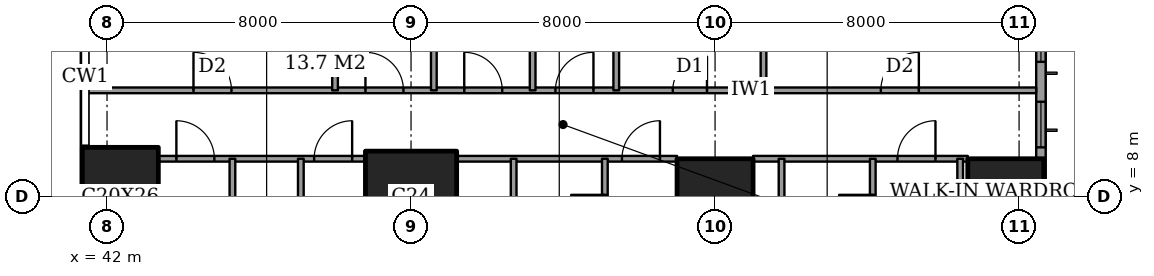
"""IFC4 building model, lengths in metres.
Left out: names, types, materials, properties, quantities, classifications, styles, units other than length and angle.
Written with IfcOpenShell. Run it as: python <this file> out.ifc"""

import sys

from ifc_helpers import new_model, si_unit, direction, frame, frame_2d, origin, origin_2d, place, context, subcontext, project, spatial, rectangle, extrude, element, fill, save


model = new_model("IFC4")
c1 = context("Model", 3, precision=1e-05, world=origin(), true_north=direction((0.0, 1.0)))
c2 = subcontext(c1, "Body", "Model", "MODEL_VIEW")
j1 = project(units=[si_unit("LENGTHUNIT", "METRE"), si_unit("PLANEANGLEUNIT", "RADIAN")], contexts=[c1])
p1 = place(None, origin())
s1 = spatial("IfcSite", under=j1, at=p1, CompositionType="ELEMENT")
p2 = place(p1, origin())
s2 = spatial("IfcBuilding", under=s1, at=p2, CompositionType="ELEMENT")
p3 = place(p2, frame((0.0, 0.0, 47.6)))
s3 = spatial("IfcBuildingStorey", under=s2, at=p3, CompositionType="ELEMENT", Elevation=47.6)
p4 = place(p3, frame((42.35, 8.0, 0.0), z_axis=(0.0, 0.0, 1.0), x_axis=(1.0, 0.0, 0.0)))
e1 = element("IfcColumn", 1, at=p4, inside=s3, PredefinedType="COLUMN", context=c2, shape_type="SweptSolid", body=[
    extrude(rectangle(XDim=2.0, YDim=2.6, at=origin_2d()), origin(), (0.0, 0.0, 1.0), 3.6),
])
p5 = place(p3, frame((50.0, 8.0, 0.0), z_axis=(0.0, 0.0, 1.0), x_axis=(1.0, 0.0, 0.0)))
e2 = element("IfcColumn", 2, at=p5, inside=s3, PredefinedType="COLUMN", context=c2, shape_type="SweptSolid", body=[
    extrude(rectangle(XDim=2.4, YDim=2.4, at=origin_2d()), origin(), (0.0, 0.0, 1.0), 3.6),
])
for number, where, z_axis, x_axis in (
    (3, (58.0, 8.0, 0.0), (0.0, 0.0, 1.0), (1.0, 0.0, 0.0)),
    (4, (65.65, 8.0, 0.0), (0.0, 0.0, 1.0), (1.0, 0.0, 0.0)),
):
    element("IfcColumn", number, at=place(p3, frame(where, z_axis=z_axis, x_axis=x_axis)), inside=s3, PredefinedType="COLUMN", context=c2, shape_type="SweptSolid", body=[
        extrude(rectangle(XDim=2.0, YDim=2.0, at=origin_2d()), origin(), (0.0, 0.0, 1.0), 3.6),
    ])
p6 = place(p3, frame((66.575, 3.175, 0.0), z_axis=(0.0, 0.0, 1.0), x_axis=(0.0, 1.0, 0.0)))
e5 = element("IfcWall", 5, at=p6, inside=s3, PredefinedType="SOLIDWALL", context=c2, shape_type="SweptSolid", body=[
    extrude(rectangle(XDim=41.65, YDim=0.25, at=frame_2d((20.825, 0.0))), origin(), (0.0, 0.0, 1.0), 3.6),
])
p7 = place(p6, frame((0.775, 0.0, 0.6)))
e6 = element("IfcOpeningElement", 6, at=p7, cuts=e5, PredefinedType="OPENING", context=c2, shape_type="SweptSolid", body=[
    extrude(rectangle(XDim=2.4, YDim=2.0, at=frame_2d((1.2, 1.0))), frame((0.0, 0.135, 0.0), z_axis=(0.0, -1.0, 0.0), x_axis=(1.0, 0.0, 0.0)), (0.0, 0.0, 1.0), 0.27),
])
p8 = place(p6, frame((6.125, 0.0, 0.6)))
e7 = element("IfcOpeningElement", 7, at=p8, cuts=e5, PredefinedType="OPENING", context=c2, shape_type="SweptSolid", body=[
    extrude(rectangle(XDim=1.2, YDim=2.0, at=frame_2d((0.6, 1.0))), frame((0.0, 0.135, 0.0), z_axis=(0.0, -1.0, 0.0), x_axis=(1.0, 0.0, 0.0)), (0.0, 0.0, 1.0), 0.27),
])
p9 = place(p6, frame((8.375, 0.0, 0.6)))
e8 = element("IfcOpeningElement", 8, at=p9, cuts=e5, PredefinedType="OPENING", context=c2, shape_type="SweptSolid", body=[
    extrude(rectangle(XDim=2.4, YDim=2.0, at=frame_2d((1.2, 1.0))), frame((0.0, 0.135, 0.0), z_axis=(0.0, -1.0, 0.0), x_axis=(1.0, 0.0, 0.0)), (0.0, 0.0, 1.0), 0.27),
])
p10 = place(p6, frame((15.775, 0.0, 0.6)))
e9 = element("IfcOpeningElement", 9, at=p10, cuts=e5, PredefinedType="OPENING", context=c2, shape_type="SweptSolid", body=[
    extrude(rectangle(XDim=2.4, YDim=2.0, at=frame_2d((1.2, 1.0))), frame((0.0, 0.135, 0.0), z_axis=(0.0, -1.0, 0.0), x_axis=(1.0, 0.0, 0.0)), (0.0, 0.0, 1.0), 0.27),
])
p11 = place(p6, frame((23.475, 0.0, 0.6)))
e10 = element("IfcOpeningElement", 10, at=p11, cuts=e5, PredefinedType="OPENING", context=c2, shape_type="SweptSolid", body=[
    extrude(rectangle(XDim=2.4, YDim=2.0, at=frame_2d((1.2, 1.0))), frame((0.0, 0.135, 0.0), z_axis=(0.0, -1.0, 0.0), x_axis=(1.0, 0.0, 0.0)), (0.0, 0.0, 1.0), 0.27),
])
p12 = place(p6, frame((30.775, 0.0, 0.6)))
e11 = element("IfcOpeningElement", 11, at=p12, cuts=e5, PredefinedType="OPENING", context=c2, shape_type="SweptSolid", body=[
    extrude(rectangle(XDim=2.4, YDim=2.0, at=frame_2d((1.2, 1.0))), frame((0.0, 0.135, 0.0), z_axis=(0.0, -1.0, 0.0), x_axis=(1.0, 0.0, 0.0)), (0.0, 0.0, 1.0), 0.27),
])
p13 = place(p6, frame((34.125, 0.0, 0.6)))
e12 = element("IfcOpeningElement", 12, at=p13, cuts=e5, PredefinedType="OPENING", context=c2, shape_type="SweptSolid", body=[
    extrude(rectangle(XDim=1.2, YDim=2.0, at=frame_2d((0.6, 1.0))), frame((0.0, 0.135, 0.0), z_axis=(0.0, -1.0, 0.0), x_axis=(1.0, 0.0, 0.0)), (0.0, 0.0, 1.0), 0.27),
])
p14 = place(p6, frame((38.475, 0.0, 0.6)))
e13 = element("IfcOpeningElement", 13, at=p14, cuts=e5, PredefinedType="OPENING", context=c2, shape_type="SweptSolid", body=[
    extrude(rectangle(XDim=2.4, YDim=2.0, at=frame_2d((1.2, 1.0))), frame((0.0, 0.135, 0.0), z_axis=(0.0, -1.0, 0.0), x_axis=(1.0, 0.0, 0.0)), (0.0, 0.0, 1.0), 0.27),
])
p15 = place(p3, frame((43.35, 9.0, 0.0), z_axis=(0.0, 0.0, 1.0), x_axis=(1.0, 0.0, 0.0)))
e14 = element("IfcWall", 14, at=p15, inside=s3, PredefinedType="PARTITIONING", context=c2, shape_type="SweptSolid", body=[
    extrude(rectangle(XDim=5.45, YDim=0.15, at=frame_2d((2.725, 0.0))), origin(), (0.0, 0.0, 1.0), 3.35),
])
p16 = place(p15, frame((4.1, 0.0, 0.0)))
e15 = element("IfcOpeningElement", 15, at=p16, cuts=e14, PredefinedType="OPENING", context=c2, shape_type="SweptSolid", body=[
    extrude(rectangle(XDim=1.0, YDim=2.1, at=frame_2d((0.5, 1.05))), frame((0.0, 0.085, 0.0), z_axis=(0.0, -1.0, 0.0), x_axis=(1.0, 0.0, 0.0)), (0.0, 0.0, 1.0), 0.17),
])
p17 = place(p15, frame((0.475, 0.0, 0.0)))
e16 = element("IfcOpeningElement", 16, at=p17, cuts=e14, PredefinedType="OPENING", context=c2, shape_type="SweptSolid", body=[
    extrude(rectangle(XDim=1.0, YDim=2.1, at=frame_2d((0.5, 1.05))), frame((0.0, 0.085, 0.0), z_axis=(0.0, -1.0, 0.0), x_axis=(1.0, 0.0, 0.0)), (0.0, 0.0, 1.0), 0.17),
])
p18 = place(p3, frame((51.2, 9.0, 0.0), z_axis=(0.0, 0.0, 1.0), x_axis=(1.0, 0.0, 0.0)))
e17 = element("IfcWall", 17, at=p18, inside=s3, PredefinedType="PARTITIONING", context=c2, shape_type="SweptSolid", body=[
    extrude(rectangle(XDim=5.8, YDim=0.15, at=frame_2d((2.9, 0.0))), origin(), (0.0, 0.0, 1.0), 3.35),
])
p19 = place(p18, frame((4.35, 0.0, 0.0)))
e18 = element("IfcOpeningElement", 18, at=p19, cuts=e17, PredefinedType="OPENING", context=c2, shape_type="SweptSolid", body=[
    extrude(rectangle(XDim=1.0, YDim=2.1, at=frame_2d((0.5, 1.05))), frame((0.0, 0.085, 0.0), z_axis=(0.0, -1.0, 0.0), x_axis=(1.0, 0.0, 0.0)), (0.0, 0.0, 1.0), 0.17),
])
p20 = place(p3, frame((59.0, 9.0, 0.0), z_axis=(0.0, 0.0, 1.0), x_axis=(1.0, 0.0, 0.0)))
e19 = element("IfcWall", 19, at=p20, inside=s3, PredefinedType="PARTITIONING", context=c2, shape_type="SweptSolid", body=[
    extrude(rectangle(XDim=5.65, YDim=0.15, at=frame_2d((2.825, 0.0))), origin(), (0.0, 0.0, 1.0), 3.35),
])
p21 = place(p20, frame((3.8, 0.0, 0.0)))
e20 = element("IfcOpeningElement", 20, at=p21, cuts=e19, PredefinedType="OPENING", context=c2, shape_type="SweptSolid", body=[
    extrude(rectangle(XDim=1.0, YDim=2.1, at=frame_2d((0.5, 1.05))), frame((0.0, 0.085, 0.0), z_axis=(0.0, -1.0, 0.0), x_axis=(1.0, 0.0, 0.0)), (0.0, 0.0, 1.0), 0.17),
])
p22 = place(p3, frame((41.439, 10.8, 0.0), z_axis=(0.0, 0.0, 1.0), x_axis=(1.0, 0.0, 0.0)))
e21 = element("IfcWall", 21, at=p22, inside=s3, PredefinedType="PARTITIONING", context=c2, shape_type="SweptSolid", body=[
    extrude(rectangle(XDim=25.011, YDim=0.15, at=frame_2d((12.505, 0.0))), origin(), (0.0, 0.0, 1.0), 3.35),
])
p23 = place(p22, frame((12.361, 0.0, 0.0)))
e22 = element("IfcOpeningElement", 22, at=p23, cuts=e21, PredefinedType="OPENING", context=c2, shape_type="SweptSolid", body=[
    extrude(rectangle(XDim=1.0, YDim=2.1, at=frame_2d((0.5, 1.05))), frame((0.0, 0.085, 0.0), z_axis=(0.0, -1.0, 0.0), x_axis=(1.0, 0.0, 0.0)), (0.0, 0.0, 1.0), 0.17),
])
p24 = place(p22, frame((20.924, 0.0, 0.0)))
e23 = element("IfcOpeningElement", 23, at=p24, cuts=e21, PredefinedType="OPENING", context=c2, shape_type="SweptSolid", body=[
    extrude(rectangle(XDim=1.0, YDim=2.1, at=frame_2d((0.5, 1.05))), frame((0.0, 0.085, 0.0), z_axis=(0.0, -1.0, 0.0), x_axis=(1.0, 0.0, 0.0)), (0.0, 0.0, 1.0), 0.17),
])
p25 = place(p22, frame((15.448, 0.0, 0.0)))
e24 = element("IfcOpeningElement", 24, at=p25, cuts=e21, PredefinedType="OPENING", context=c2, shape_type="SweptSolid", body=[
    extrude(rectangle(XDim=0.9, YDim=2.1, at=frame_2d((0.45, 1.05))), frame((0.0, 0.085, 0.0), z_axis=(0.0, -1.0, 0.0), x_axis=(1.0, 0.0, 0.0)), (0.0, 0.0, 1.0), 0.17),
])
p26 = place(p22, frame((9.961, 0.0, 0.0)))
e25 = element("IfcOpeningElement", 25, at=p26, cuts=e21, PredefinedType="OPENING", context=c2, shape_type="SweptSolid", body=[
    extrude(rectangle(XDim=1.0, YDim=2.1, at=frame_2d((0.5, 1.05))), frame((0.0, 0.085, 0.0), z_axis=(0.0, -1.0, 0.0), x_axis=(1.0, 0.0, 0.0)), (0.0, 0.0, 1.0), 0.17),
])
p27 = place(p22, frame((7.361, 0.0, 0.0)))
e26 = element("IfcOpeningElement", 26, at=p27, cuts=e21, PredefinedType="OPENING", context=c2, shape_type="SweptSolid", body=[
    extrude(rectangle(XDim=1.0, YDim=2.1, at=frame_2d((0.5, 1.05))), frame((0.0, 0.085, 0.0), z_axis=(0.0, -1.0, 0.0), x_axis=(1.0, 0.0, 0.0)), (0.0, 0.0, 1.0), 0.17),
])
p28 = place(p22, frame((2.836, 0.0, 0.0)))
e27 = element("IfcOpeningElement", 27, at=p28, cuts=e21, PredefinedType="OPENING", context=c2, shape_type="SweptSolid", body=[
    extrude(rectangle(XDim=1.0, YDim=2.1, at=frame_2d((0.5, 1.05))), frame((0.0, 0.085, 0.0), z_axis=(0.0, -1.0, 0.0), x_axis=(1.0, 0.0, 0.0)), (0.0, 0.0, 1.0), 0.17),
])
p29 = place(p3, frame((45.3, -0.45, 0.0), z_axis=(0.0, 0.0, 1.0), x_axis=(0.0, 1.0, 0.0)))
e28 = element("IfcWall", 28, at=p29, inside=s3, PredefinedType="PARTITIONING", context=c2, shape_type="SweptSolid", body=[
    extrude(rectangle(XDim=9.45, YDim=0.15, at=frame_2d((4.725, 0.0))), origin(), (0.0, 0.0, 1.0), 3.35),
])
p30 = place(p3, frame((47.1, 5.2, 0.0), z_axis=(0.0, 0.0, 1.0), x_axis=(0.0, 1.0, 0.0)))
e29 = element("IfcWall", 29, at=p30, inside=s3, PredefinedType="PARTITIONING", context=c2, shape_type="SweptSolid", body=[
    extrude(rectangle(XDim=3.8, YDim=0.15, at=frame_2d((1.9, 0.0))), origin(), (0.0, 0.0, 1.0), 3.35),
])
p31 = place(p30, frame((1.45, 0.0, 0.0)))
e30 = element("IfcOpeningElement", 30, at=p31, cuts=e29, PredefinedType="OPENING", context=c2, shape_type="SweptSolid", body=[
    extrude(rectangle(XDim=0.9, YDim=2.1, at=frame_2d((0.45, 1.05))), frame((0.0, 0.085, 0.0), z_axis=(0.0, -1.0, 0.0), x_axis=(1.0, 0.0, 0.0)), (0.0, 0.0, 1.0), 0.17),
])
p32 = place(p3, frame((48.0, 10.8, 0.0), z_axis=(0.0, 0.0, 1.0), x_axis=(0.0, 1.0, 0.0)))
e31 = element("IfcWall", 31, at=p32, inside=s3, PredefinedType="PARTITIONING", context=c2, shape_type="SweptSolid", body=[
    extrude(rectangle(XDim=6.7, YDim=0.15, at=frame_2d((3.35, 0.0))), origin(), (0.0, 0.0, 1.0), 3.35),
])
p33 = place(p3, frame((50.6, 10.8, 0.0), z_axis=(0.0, 0.0, 1.0), x_axis=(0.0, 1.0, 0.0)))
e32 = element("IfcWall", 32, at=p33, inside=s3, PredefinedType="PARTITIONING", context=c2, shape_type="SweptSolid", body=[
    extrude(rectangle(XDim=4.0, YDim=0.15, at=frame_2d((2.0, 0.0))), origin(), (0.0, 0.0, 1.0), 3.35),
])
p34 = place(p3, frame((52.7, -0.45, 0.0), z_axis=(0.0, 0.0, 1.0), x_axis=(0.0, 1.0, 0.0)))
e33 = element("IfcWall", 33, at=p34, inside=s3, PredefinedType="PARTITIONING", context=c2, shape_type="SweptSolid", body=[
    extrude(rectangle(XDim=9.45, YDim=0.15, at=frame_2d((4.725, 0.0))), origin(), (0.0, 0.0, 1.0), 3.35),
])
p35 = place(p34, frame((2.875, 0.0, 0.0)))
e34 = element("IfcOpeningElement", 34, at=p35, cuts=e33, PredefinedType="OPENING", context=c2, shape_type="SweptSolid", body=[
    extrude(rectangle(XDim=0.9, YDim=2.1, at=frame_2d((0.45, 1.05))), frame((0.0, 0.085, 0.0), z_axis=(0.0, -1.0, 0.0), x_axis=(1.0, 0.0, 0.0)), (0.0, 0.0, 1.0), 0.17),
])
p36 = place(p3, frame((53.2, 10.8, 0.0), z_axis=(0.0, 0.0, 1.0), x_axis=(0.0, 1.0, 0.0)))
e35 = element("IfcWall", 35, at=p36, inside=s3, PredefinedType="PARTITIONING", context=c2, shape_type="SweptSolid", body=[
    extrude(rectangle(XDim=6.7, YDim=0.15, at=frame_2d((3.35, 0.0))), origin(), (0.0, 0.0, 1.0), 3.35),
])
p37 = place(p3, frame((55.1, 6.2, 0.0), z_axis=(0.0, 0.0, 1.0), x_axis=(0.0, 1.0, 0.0)))
e36 = element("IfcWall", 36, at=p37, inside=s3, PredefinedType="PARTITIONING", context=c2, shape_type="SweptSolid", body=[
    extrude(rectangle(XDim=2.8, YDim=0.15, at=frame_2d((1.4, 0.0))), origin(), (0.0, 0.0, 1.0), 3.35),
])
p38 = place(p37, frame((0.95, 0.0, 0.0)))
e37 = element("IfcOpeningElement", 37, at=p38, cuts=e36, PredefinedType="OPENING", context=c2, shape_type="SweptSolid", body=[
    extrude(rectangle(XDim=0.9, YDim=2.1, at=frame_2d((0.45, 1.05))), frame((0.0, 0.085, 0.0), z_axis=(0.0, -1.0, 0.0), x_axis=(1.0, 0.0, 0.0)), (0.0, 0.0, 1.0), 0.17),
])
p39 = place(p3, frame((55.4, 10.8, 0.0), z_axis=(0.0, 0.0, 1.0), x_axis=(0.0, 1.0, 0.0)))
e38 = element("IfcWall", 38, at=p39, inside=s3, PredefinedType="PARTITIONING", context=c2, shape_type="SweptSolid", body=[
    extrude(rectangle(XDim=10.8, YDim=0.15, at=frame_2d((5.4, 0.0))), origin(), (0.0, 0.0, 1.0), 3.35),
])
p40 = place(p39, frame((8.25, 0.0, 0.0)))
e39 = element("IfcOpeningElement", 39, at=p40, cuts=e38, PredefinedType="OPENING", context=c2, shape_type="SweptSolid", body=[
    extrude(rectangle(XDim=1.0, YDim=2.1, at=frame_2d((0.5, 1.05))), frame((0.0, 0.085, 0.0), z_axis=(0.0, -1.0, 0.0), x_axis=(1.0, 0.0, 0.0)), (0.0, 0.0, 1.0), 0.17),
])
p41 = place(p3, frame((59.275, 10.8, 0.0), z_axis=(0.0, 0.0, 1.0), x_axis=(0.0, 1.0, 0.0)))
e40 = element("IfcWall", 40, at=p41, inside=s3, PredefinedType="PARTITIONING", context=c2, shape_type="SweptSolid", body=[
    extrude(rectangle(XDim=4.0, YDim=0.15, at=frame_2d((2.0, 0.0))), origin(), (0.0, 0.0, 1.0), 3.35),
])
p42 = place(p3, frame((59.75, -0.45, 0.0), z_axis=(0.0, 0.0, 1.0), x_axis=(0.0, 1.0, 0.0)))
e41 = element("IfcWall", 41, at=p42, inside=s3, PredefinedType="PARTITIONING", context=c2, shape_type="SweptSolid", body=[
    extrude(rectangle(XDim=9.45, YDim=0.15, at=frame_2d((4.725, 0.0))), origin(), (0.0, 0.0, 1.0), 3.35),
])
p43 = place(p42, frame((2.875, 0.0, 0.0)))
e42 = element("IfcOpeningElement", 42, at=p43, cuts=e41, PredefinedType="OPENING", context=c2, shape_type="SweptSolid", body=[
    extrude(rectangle(XDim=0.9, YDim=2.1, at=frame_2d((0.45, 1.05))), frame((0.0, 0.085, 0.0), z_axis=(0.0, -1.0, 0.0), x_axis=(1.0, 0.0, 0.0)), (0.0, 0.0, 1.0), 0.17),
])
p44 = place(p3, frame((62.15, 6.2, 0.0), z_axis=(0.0, 0.0, 1.0), x_axis=(0.0, 1.0, 0.0)))
e43 = element("IfcWall", 43, at=p44, inside=s3, PredefinedType="PARTITIONING", context=c2, shape_type="SweptSolid", body=[
    extrude(rectangle(XDim=2.8, YDim=0.15, at=frame_2d((1.4, 0.0))), origin(), (0.0, 0.0, 1.0), 3.35),
])
p45 = place(p44, frame((0.95, 0.0, 0.0)))
e44 = element("IfcOpeningElement", 44, at=p45, cuts=e43, PredefinedType="OPENING", context=c2, shape_type="SweptSolid", body=[
    extrude(rectangle(XDim=0.9, YDim=2.1, at=frame_2d((0.45, 1.05))), frame((0.0, 0.085, 0.0), z_axis=(0.0, -1.0, 0.0), x_axis=(1.0, 0.0, 0.0)), (0.0, 0.0, 1.0), 0.17),
])
p46 = place(p3, frame((64.45, 3.3, 0.0), z_axis=(0.0, 0.0, 1.0), x_axis=(0.0, 1.0, 0.0)))
e45 = element("IfcWall", 45, at=p46, inside=s3, PredefinedType="PARTITIONING", context=c2, shape_type="SweptSolid", body=[
    extrude(rectangle(XDim=5.7, YDim=0.15, at=frame_2d((2.85, 0.0))), origin(), (0.0, 0.0, 1.0), 3.35),
])
p47 = place(p46, frame((2.4, 0.0, 0.0)))
e46 = element("IfcOpeningElement", 46, at=p47, cuts=e45, PredefinedType="OPENING", context=c2, shape_type="SweptSolid", body=[
    extrude(rectangle(XDim=0.9, YDim=2.1, at=frame_2d((0.45, 1.05))), frame((0.0, 0.085, 0.0), z_axis=(0.0, -1.0, 0.0), x_axis=(1.0, 0.0, 0.0)), (0.0, 0.0, 1.0), 0.17),
])
p48 = place(p8, origin())
e47 = element("IfcWindow", 47, at=p48, inside=s3, PartitioningType="SINGLE_PANEL", PredefinedType="WINDOW", context=c2, shape_type="SweptSolid", body=[
    extrude(rectangle(XDim=1.2, YDim=2.0, at=frame_2d((0.6, 1.0))), frame((0.0, 0.03, 0.0), z_axis=(0.0, -1.0, 0.0), x_axis=(1.0, 0.0, 0.0)), (0.0, 0.0, 1.0), 0.06),
])
fill(e7, e47)
p49 = place(p9, origin())
e48 = element("IfcWindow", 48, at=p49, inside=s3, PartitioningType="SINGLE_PANEL", PredefinedType="WINDOW", context=c2, shape_type="SweptSolid", body=[
    extrude(rectangle(XDim=2.4, YDim=2.0, at=frame_2d((1.2, 1.0))), frame((0.0, 0.03, 0.0), z_axis=(0.0, -1.0, 0.0), x_axis=(1.0, 0.0, 0.0)), (0.0, 0.0, 1.0), 0.06),
])
fill(e8, e48)
p50 = place(p45, origin())
e49 = element("IfcDoor", 49, at=p50, inside=s3, OperationType="SINGLE_SWING_LEFT", PredefinedType="DOOR", context=c2, shape_type="SweptSolid", body=[
    extrude(rectangle(XDim=0.9, YDim=2.1, at=frame_2d((0.45, 1.05))), frame((0.0, 0.025, 0.0), z_axis=(0.0, -1.0, 0.0), x_axis=(1.0, 0.0, 0.0)), (0.0, 0.0, 1.0), 0.05),
])
fill(e44, e49)
p51 = place(p21, origin())
e50 = element("IfcDoor", 50, at=p51, inside=s3, OperationType="SINGLE_SWING_LEFT", PredefinedType="DOOR", context=c2, shape_type="SweptSolid", body=[
    extrude(rectangle(XDim=1.0, YDim=2.1, at=frame_2d((0.5, 1.05))), frame((0.0, 0.025, 0.0), z_axis=(0.0, -1.0, 0.0), x_axis=(1.0, 0.0, 0.0)), (0.0, 0.0, 1.0), 0.05),
])
fill(e20, e50)
p52 = place(p38, origin())
e51 = element("IfcDoor", 51, at=p52, inside=s3, OperationType="SINGLE_SWING_LEFT", PredefinedType="DOOR", context=c2, shape_type="SweptSolid", body=[
    extrude(rectangle(XDim=0.9, YDim=2.1, at=frame_2d((0.45, 1.05))), frame((0.0, 0.025, 0.0), z_axis=(0.0, -1.0, 0.0), x_axis=(1.0, 0.0, 0.0)), (0.0, 0.0, 1.0), 0.05),
])
fill(e37, e51)
p53 = place(p19, origin())
e52 = element("IfcDoor", 52, at=p53, inside=s3, OperationType="SINGLE_SWING_LEFT", PredefinedType="DOOR", context=c2, shape_type="SweptSolid", body=[
    extrude(rectangle(XDim=1.0, YDim=2.1, at=frame_2d((0.5, 1.05))), frame((0.0, 0.025, 0.0), z_axis=(0.0, -1.0, 0.0), x_axis=(1.0, 0.0, 0.0)), (0.0, 0.0, 1.0), 0.05),
])
fill(e18, e52)
p54 = place(p16, origin())
e53 = element("IfcDoor", 53, at=p54, inside=s3, OperationType="SINGLE_SWING_LEFT", PredefinedType="DOOR", context=c2, shape_type="SweptSolid", body=[
    extrude(rectangle(XDim=1.0, YDim=2.1, at=frame_2d((0.5, 1.05))), frame((0.0, 0.025, 0.0), z_axis=(0.0, -1.0, 0.0), x_axis=(1.0, 0.0, 0.0)), (0.0, 0.0, 1.0), 0.05),
])
fill(e15, e53)
p55 = place(p17, origin())
e54 = element("IfcDoor", 54, at=p55, inside=s3, OperationType="SINGLE_SWING_RIGHT", PredefinedType="DOOR", context=c2, shape_type="SweptSolid", body=[
    extrude(rectangle(XDim=1.0, YDim=2.1, at=frame_2d((0.5, 1.05))), frame((0.0, 0.025, 0.0), z_axis=(0.0, -1.0, 0.0), x_axis=(1.0, 0.0, 0.0)), (0.0, 0.0, 1.0), 0.05),
])
fill(e16, e54)
p56 = place(p23, origin())
e55 = element("IfcDoor", 55, at=p56, inside=s3, OperationType="SINGLE_SWING_LEFT", PredefinedType="DOOR", context=c2, shape_type="SweptSolid", body=[
    extrude(rectangle(XDim=1.0, YDim=2.1, at=frame_2d((0.5, 1.05))), frame((0.0, 0.025, 0.0), z_axis=(0.0, -1.0, 0.0), x_axis=(1.0, 0.0, 0.0)), (0.0, 0.0, 1.0), 0.05),
])
fill(e22, e55)
p57 = place(p24, origin())
e56 = element("IfcDoor", 56, at=p57, inside=s3, OperationType="SINGLE_SWING_LEFT", PredefinedType="DOOR", context=c2, shape_type="SweptSolid", body=[
    extrude(rectangle(XDim=1.0, YDim=2.1, at=frame_2d((0.5, 1.05))), frame((0.0, 0.025, 0.0), z_axis=(0.0, -1.0, 0.0), x_axis=(1.0, 0.0, 0.0)), (0.0, 0.0, 1.0), 0.05),
])
fill(e23, e56)
p58 = place(p25, origin())
e57 = element("IfcDoor", 57, at=p58, inside=s3, OperationType="SINGLE_SWING_LEFT", PredefinedType="DOOR", context=c2, shape_type="SweptSolid", body=[
    extrude(rectangle(XDim=0.9, YDim=2.1, at=frame_2d((0.45, 1.05))), frame((0.0, 0.025, 0.0), z_axis=(0.0, -1.0, 0.0), x_axis=(1.0, 0.0, 0.0)), (0.0, 0.0, 1.0), 0.05),
])
fill(e24, e57)
p59 = place(p26, origin())
e58 = element("IfcDoor", 58, at=p59, inside=s3, OperationType="SINGLE_SWING_RIGHT", PredefinedType="DOOR", context=c2, shape_type="SweptSolid", body=[
    extrude(rectangle(XDim=1.0, YDim=2.1, at=frame_2d((0.5, 1.05))), frame((0.0, 0.025, 0.0), z_axis=(0.0, -1.0, 0.0), x_axis=(1.0, 0.0, 0.0)), (0.0, 0.0, 1.0), 0.05),
])
fill(e25, e58)
p60 = place(p27, origin())
e59 = element("IfcDoor", 59, at=p60, inside=s3, OperationType="SINGLE_SWING_RIGHT", PredefinedType="DOOR", context=c2, shape_type="SweptSolid", body=[
    extrude(rectangle(XDim=1.0, YDim=2.1, at=frame_2d((0.5, 1.05))), frame((0.0, 0.025, 0.0), z_axis=(0.0, -1.0, 0.0), x_axis=(1.0, 0.0, 0.0)), (0.0, 0.0, 1.0), 0.05),
])
fill(e26, e59)
p61 = place(p28, origin())
e60 = element("IfcDoor", 60, at=p61, inside=s3, OperationType="SINGLE_SWING_RIGHT", PredefinedType="DOOR", context=c2, shape_type="SweptSolid", body=[
    extrude(rectangle(XDim=1.0, YDim=2.1, at=frame_2d((0.5, 1.05))), frame((0.0, 0.025, 0.0), z_axis=(0.0, -1.0, 0.0), x_axis=(1.0, 0.0, 0.0)), (0.0, 0.0, 1.0), 0.05),
])
fill(e27, e60)
save(model, sys.argv[1])
